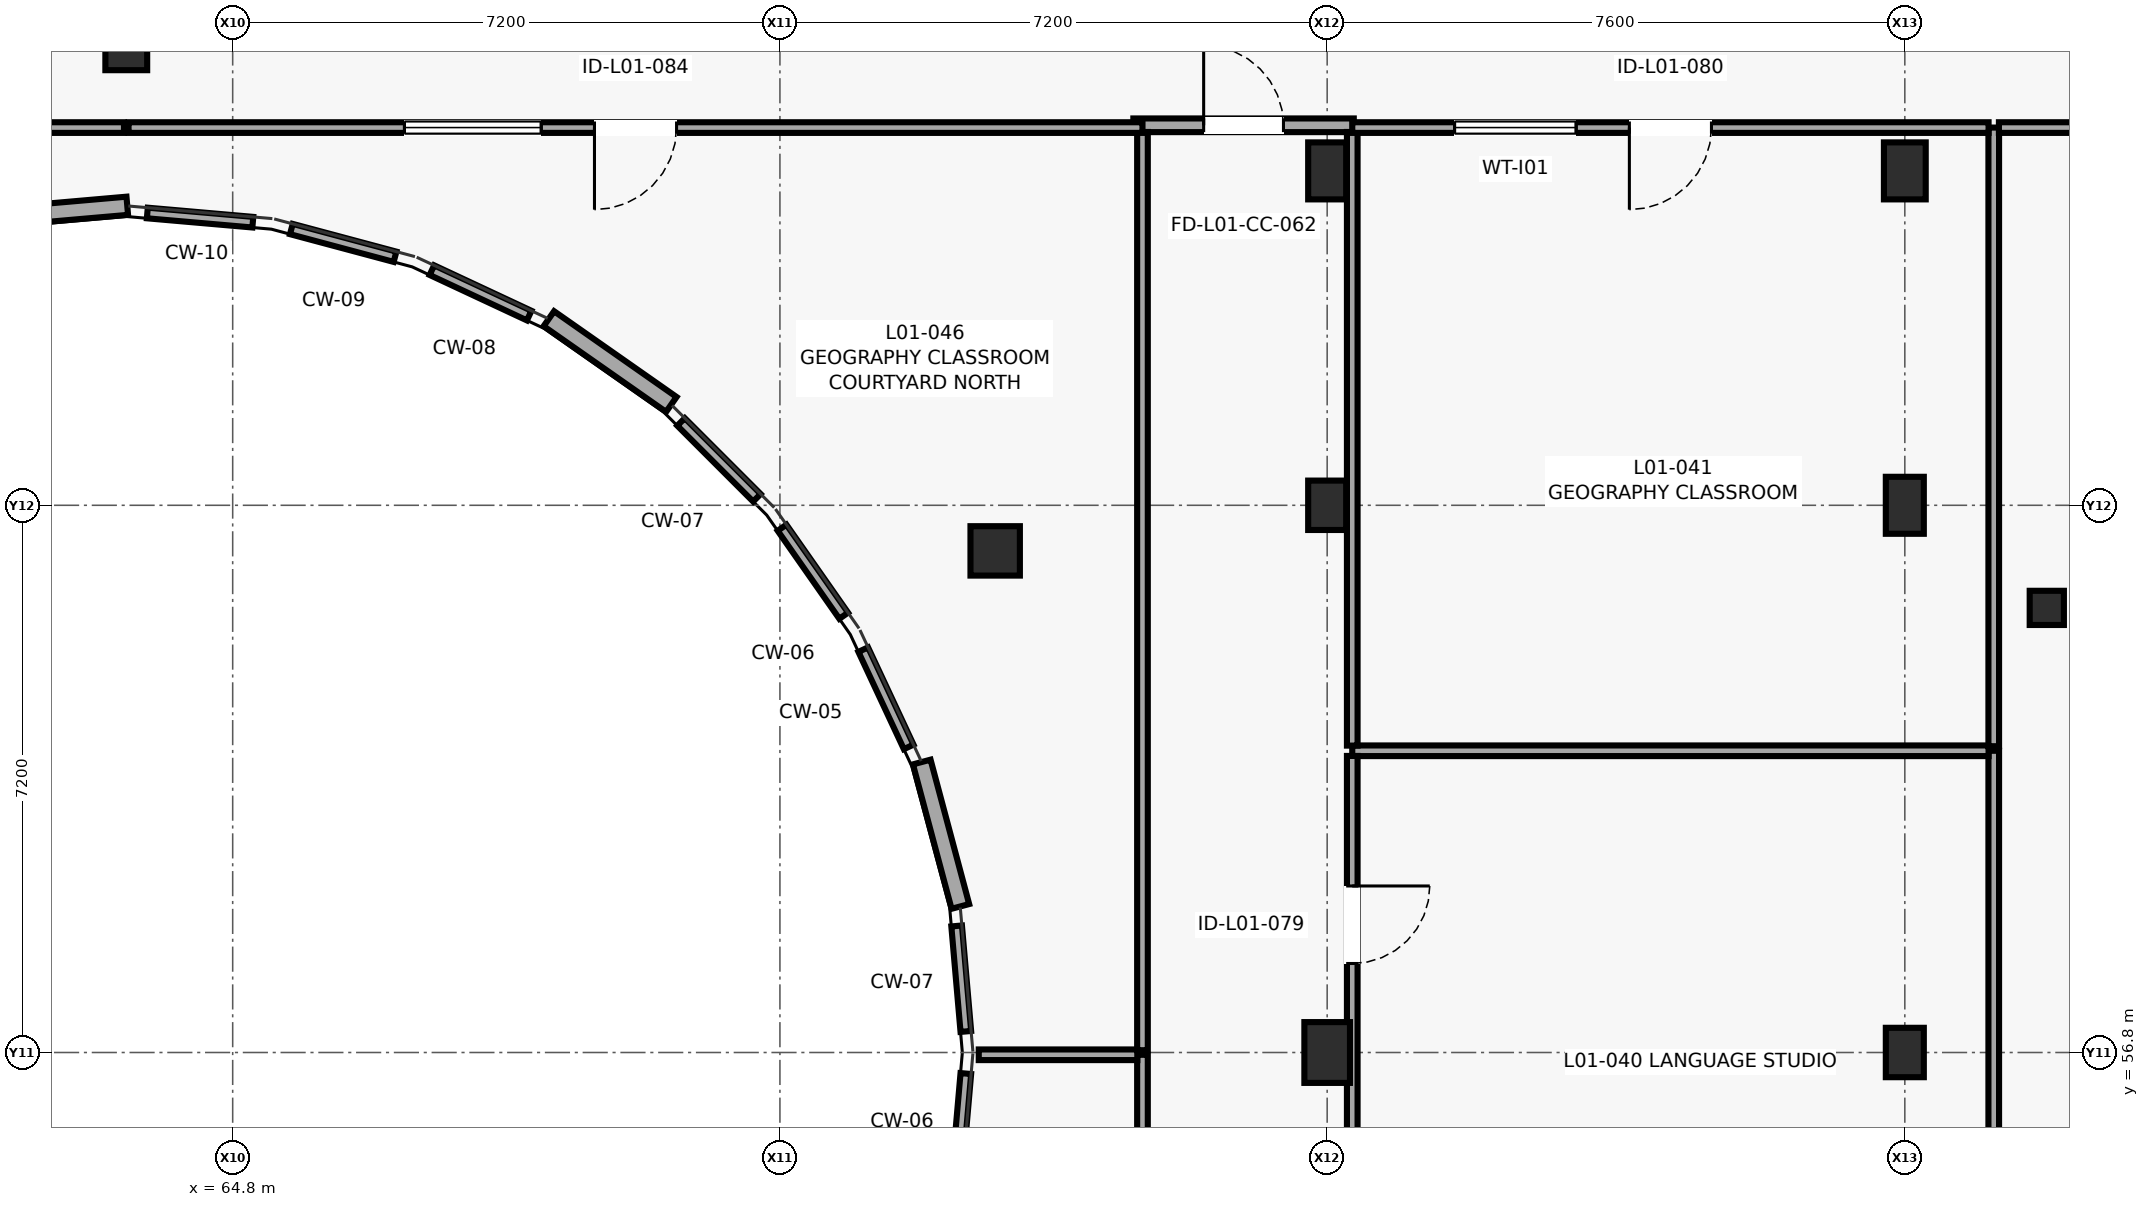
"""IFC4 building model, lengths in metres.
Left out: names, types, materials, properties, quantities, classifications, styles, units other than length and angle.
Written with IfcOpenShell. Run it as: python <this file> out.ifc"""

import sys

from ifc_helpers import new_model, si_unit, direction, frame, frame_2d, origin, origin_2d, place, context, subcontext, project, spatial, rectangle, circle, extrude, element, fill, save


model = new_model("IFC4")
c1 = context("Model", 3, precision=1e-05, world=origin(), true_north=direction((0.0, 1.0)))
c2 = subcontext(c1, "Body", "Model", "MODEL_VIEW")
j1 = project(units=[si_unit("LENGTHUNIT", "METRE"), si_unit("PLANEANGLEUNIT", "RADIAN")], contexts=[c1])
p1 = place(None, origin())
s1 = spatial("IfcSite", under=j1, at=p1, CompositionType="ELEMENT")
p2 = place(p1, origin())
s2 = spatial("IfcBuilding", under=s1, at=p2, CompositionType="ELEMENT")
p3 = place(p2, frame((0.0, 0.0, 4.2)))
s3 = spatial("IfcBuildingStorey", under=s2, at=p3, CompositionType="ELEMENT", Elevation=4.2)
p4 = place(p3, frame((63.4, 70.0, 0.0), z_axis=(0.0, 0.0, 1.0), x_axis=(1.0, 0.0, 0.0)))
e1 = element("IfcColumn", 1, at=p4, inside=s3, PredefinedType="COLUMN", context=c2, shape_type="SweptSolid", body=[
    extrude(circle(Radius=0.275, at=origin_2d()), origin(), (0.0, 0.0, 1.0), 4.0),
])
p5 = place(p3, frame((74.832, 63.4, 0.0), z_axis=(0.0, 0.0, 1.0), x_axis=(1.0, 0.0, 0.0)))
e2 = element("IfcColumn", 2, at=p5, inside=s3, PredefinedType="COLUMN", context=c2, shape_type="SweptSolid", body=[
    extrude(circle(Radius=0.325, at=origin_2d()), origin(), (0.0, 0.0, 1.0), 4.0),
])
p6 = place(p3, frame((79.2, 56.8, 0.0), z_axis=(0.0, 0.0, 1.0), x_axis=(1.0, 0.0, 0.0)))
e3 = element("IfcColumn", 3, at=p6, inside=s3, PredefinedType="COLUMN", context=c2, shape_type="SweptSolid", body=[
    extrude(rectangle(XDim=0.6, YDim=0.8, at=origin_2d()), origin(), (0.0, 0.0, 1.0), 4.0),
])
p7 = place(p3, frame((79.2, 64.0, 0.0), z_axis=(0.0, 0.0, 1.0), x_axis=(1.0, 0.0, 0.0)))
e4 = element("IfcColumn", 4, at=p7, inside=s3, PredefinedType="COLUMN", context=c2, shape_type="SweptSolid", body=[
    extrude(rectangle(XDim=0.5, YDim=0.65, at=origin_2d()), origin(), (0.0, 0.0, 1.0), 4.0),
])
p8 = place(p3, frame((79.2, 68.4, 0.0), z_axis=(0.0, 0.0, 1.0), x_axis=(1.0, 0.0, 0.0)))
e5 = element("IfcColumn", 5, at=p8, inside=s3, PredefinedType="COLUMN", context=c2, shape_type="SweptSolid", body=[
    extrude(rectangle(XDim=0.5, YDim=0.75, at=origin_2d()), origin(), (0.0, 0.0, 1.0), 4.0),
])
p9 = place(p3, frame((86.8, 56.8, 0.0), z_axis=(0.0, 0.0, 1.0), x_axis=(1.0, 0.0, 0.0)))
e6 = element("IfcColumn", 6, at=p9, inside=s3, PredefinedType="COLUMN", context=c2, shape_type="SweptSolid", body=[
    extrude(rectangle(XDim=0.5, YDim=0.65, at=origin_2d()), origin(), (0.0, 0.0, 1.0), 4.0),
])
p10 = place(p3, frame((86.8, 64.0, 0.0), z_axis=(0.0, 0.0, 1.0), x_axis=(1.0, 0.0, 0.0)))
e7 = element("IfcColumn", 7, at=p10, inside=s3, PredefinedType="COLUMN", context=c2, shape_type="SweptSolid", body=[
    extrude(rectangle(XDim=0.5, YDim=0.75, at=origin_2d()), origin(), (0.0, 0.0, 1.0), 4.0),
])
p11 = place(p3, frame((86.8, 68.4, 0.0), z_axis=(0.0, 0.0, 1.0), x_axis=(1.0, 0.0, 0.0)))
e8 = element("IfcColumn", 8, at=p11, inside=s3, PredefinedType="COLUMN", context=c2, shape_type="SweptSolid", body=[
    extrude(rectangle(XDim=0.55, YDim=0.75, at=origin_2d()), origin(), (0.0, 0.0, 1.0), 4.0),
])
p12 = place(p3, frame((88.668, 62.65, 0.0), z_axis=(0.0, 0.0, 1.0), x_axis=(1.0, 0.0, 0.0)))
e9 = element("IfcColumn", 9, at=p12, inside=s3, PredefinedType="COLUMN", context=c2, shape_type="SweptSolid", body=[
    extrude(circle(Radius=0.225, at=origin_2d()), origin(), (0.0, 0.0, 1.0), 4.0),
])
p13 = place(p3, frame((70.571, 65.327, 0.0), z_axis=(0.0, 0.0, 1.0), x_axis=(-0.819132771028, 0.573603960436, 0.0)))
e10 = element("IfcWall", 10, at=p13, inside=s3, PredefinedType="SOLIDWALL", context=c2, shape_type="SweptSolid", body=[
    extrude(rectangle(XDim=1.967, YDim=0.24, at=frame_2d((0.983, 0.0))), origin(), (0.0, 0.0, 1.0), 3.78),
])
p14 = place(p3, frame((63.413, 67.941, 0.0), z_axis=(0.0, 0.0, 1.0), x_axis=(-0.996221008334, -0.0868544907, 0.0)))
e11 = element("IfcWall", 11, at=p14, inside=s3, PredefinedType="SOLIDWALL", context=c2, shape_type="SweptSolid", body=[
    extrude(rectangle(XDim=1.968, YDim=0.24, at=frame_2d((0.984, 0.0))), origin(), (0.0, 0.0, 1.0), 3.78),
])
p15 = place(p3, frame((74.374, 58.722, 0.0), z_axis=(0.0, 0.0, 1.0), x_axis=(-0.258303819724, 0.966063733258, 0.0)))
e12 = element("IfcWall", 12, at=p15, inside=s3, PredefinedType="SOLIDWALL", context=c2, shape_type="SweptSolid", body=[
    extrude(rectangle(XDim=1.967, YDim=0.24, at=frame_2d((0.983, 0.0))), origin(), (0.0, 0.0, 1.0), 3.78),
])
p16 = place(p3, frame((76.65, 69.0, 0.0), z_axis=(0.0, 0.0, 1.0), x_axis=(1.0, 0.0, 0.0)))
e13 = element("IfcWall", 13, at=p16, inside=s3, PredefinedType="PARTITIONING", context=c2, shape_type="SweptSolid", body=[
    extrude(rectangle(XDim=2.9, YDim=0.18, at=frame_2d((1.45, 0.0))), origin(), (0.0, 0.0, 1.0), 3.78),
])
p17 = place(p16, frame((0.925, 0.0, 0.0)))
e14 = element("IfcOpeningElement", 14, at=p17, cuts=e13, PredefinedType="OPENING", context=c2, shape_type="SweptSolid", body=[
    extrude(rectangle(XDim=1.05, YDim=2.15, at=frame_2d((0.525, 1.075))), frame((0.0, 0.1, 0.0), z_axis=(0.0, -1.0, 0.0), x_axis=(1.0, 0.0, 0.0)), (0.0, 0.0, 1.0), 0.2),
])
p18 = place(p3, frame((87.97, 52.83, 0.0), z_axis=(0.0, 0.0, 1.0), x_axis=(0.0, 1.0, 0.0)))
e15 = element("IfcWall", 15, at=p18, inside=s3, PredefinedType="PARTITIONING", context=c2, shape_type="SweptSolid", body=[
    extrude(rectangle(XDim=7.94, YDim=0.14, at=frame_2d((3.97, 0.0))), origin(), (0.0, 0.0, 1.0), 3.775),
])
p19 = place(p3, frame((87.902, 60.77, 0.0), z_axis=(0.0, 0.0, 1.0), x_axis=(-1.0, 0.0, 0.0)))
e16 = element("IfcWall", 16, at=p19, inside=s3, PredefinedType="PARTITIONING", context=c2, shape_type="SweptSolid", body=[
    extrude(rectangle(XDim=8.372, YDim=0.14, at=frame_2d((4.186, 0.0))), origin(), (0.0, 0.0, 1.0), 3.775),
])
p20 = place(p3, frame((79.53, 60.702, 0.0), z_axis=(0.0, 0.0, 1.0), x_axis=(0.0, -1.0, 0.0)))
e17 = element("IfcWall", 17, at=p20, inside=s3, PredefinedType="PARTITIONING", context=c2, shape_type="SweptSolid", body=[
    extrude(rectangle(XDim=7.864, YDim=0.14, at=frame_2d((3.932, 0.0))), origin(), (0.0, 0.0, 1.0), 3.775),
])
p21 = place(p20, frame((1.711, 0.0, 0.0)))
e18 = element("IfcOpeningElement", 18, at=p21, cuts=e17, PredefinedType="OPENING", context=c2, shape_type="SweptSolid", body=[
    extrude(rectangle(XDim=1.02, YDim=2.14, at=frame_2d((0.51, 1.07))), frame((0.0, 0.08, 0.0), z_axis=(0.0, -1.0, 0.0), x_axis=(1.0, 0.0, 0.0)), (0.0, 0.0, 1.0), 0.16),
])
p22 = place(p3, frame((79.53, 68.912, 0.0), z_axis=(0.0, 0.0, 1.0), x_axis=(0.0, -1.0, 0.0)))
e19 = element("IfcWall", 19, at=p22, inside=s3, PredefinedType="PARTITIONING", context=c2, shape_type="SweptSolid", body=[
    extrude(rectangle(XDim=8.074, YDim=0.14, at=frame_2d((4.037, 0.0))), origin(), (0.0, 0.0, 1.0), 3.775),
])
p23 = place(p3, frame((87.97, 60.83, 0.0), z_axis=(0.0, 0.0, 1.0), x_axis=(0.0, 1.0, 0.0)))
e20 = element("IfcWall", 20, at=p23, inside=s3, PredefinedType="PARTITIONING", context=c2, shape_type="SweptSolid", body=[
    extrude(rectangle(XDim=8.14, YDim=0.14, at=frame_2d((4.07, 0.0))), origin(), (0.0, 0.0, 1.0), 3.775),
])
p24 = place(p3, frame((87.902, 68.97, 0.0), z_axis=(0.0, 0.0, 1.0), x_axis=(-1.0, 0.0, 0.0)))
e21 = element("IfcWall", 21, at=p24, inside=s3, PredefinedType="PARTITIONING", context=c2, shape_type="SweptSolid", body=[
    extrude(rectangle(XDim=8.372, YDim=0.14, at=frame_2d((4.186, 0.0))), origin(), (0.0, 0.0, 1.0), 3.775),
])
p25 = place(p24, frame((3.646, 0.0, 0.0)))
e22 = element("IfcOpeningElement", 22, at=p25, cuts=e21, PredefinedType="OPENING", context=c2, shape_type="SweptSolid", body=[
    extrude(rectangle(XDim=1.08, YDim=2.16, at=frame_2d((0.54, 1.08))), frame((0.0, 0.08, 0.0), z_axis=(0.0, -1.0, 0.0), x_axis=(1.0, 0.0, 0.0)), (0.0, 0.0, 1.0), 0.16),
])
p26 = place(p24, frame((5.426, 0.0, 1.05)))
e23 = element("IfcOpeningElement", 23, at=p26, cuts=e21, PredefinedType="OPENING", context=c2, shape_type="SweptSolid", body=[
    extrude(rectangle(XDim=1.6, YDim=1.1, at=frame_2d((0.8, 0.55))), frame((0.0, 0.08, 0.0), z_axis=(0.0, -1.0, 0.0), x_axis=(1.0, 0.0, 0.0)), (0.0, 0.0, 1.0), 0.16),
])
p27 = place(p3, frame((63.37, 68.97, 0.0), z_axis=(0.0, 0.0, 1.0), x_axis=(-1.0, 0.0, 0.0)))
e24 = element("IfcWall", 24, at=p27, inside=s3, PredefinedType="PARTITIONING", context=c2, shape_type="SweptSolid", body=[
    extrude(rectangle(XDim=17.54, YDim=0.14, at=frame_2d((8.77, 0.0))), origin(), (0.0, 0.0, 1.0), 3.775),
])
p28 = place(p27, frame((8.26, 0.0, 0.0)))
e25 = element("IfcOpeningElement", 25, at=p28, cuts=e24, PredefinedType="OPENING", context=c2, shape_type="SweptSolid", body=[
    extrude(rectangle(XDim=1.02, YDim=2.14, at=frame_2d((0.51, 1.07))), frame((0.0, 0.08, 0.0), z_axis=(0.0, -1.0, 0.0), x_axis=(1.0, 0.0, 0.0)), (0.0, 0.0, 1.0), 0.16),
])
p29 = place(p27, frame((9.98, 0.0, 1.05)))
e26 = element("IfcOpeningElement", 26, at=p29, cuts=e24, PredefinedType="OPENING", context=c2, shape_type="SweptSolid", body=[
    extrude(rectangle(XDim=1.4, YDim=1.05, at=frame_2d((0.7, 0.525))), frame((0.0, 0.08, 0.0), z_axis=(0.0, -1.0, 0.0), x_axis=(1.0, 0.0, 0.0)), (0.0, 0.0, 1.0), 0.16),
])
p30 = place(p3, frame((76.77, 44.698, 0.0), z_axis=(0.0, 0.0, 1.0), x_axis=(0.0, 1.0, 0.0)))
e27 = element("IfcWall", 27, at=p30, inside=s3, PredefinedType="PARTITIONING", context=c2, shape_type="SweptSolid", body=[
    extrude(rectangle(XDim=12.072, YDim=0.14, at=frame_2d((6.036, 0.0))), origin(), (0.0, 0.0, 1.0), 3.775),
])
p31 = place(p3, frame((76.702, 56.77, 0.0), z_axis=(0.0, 0.0, 1.0), x_axis=(-1.0, 0.0, 0.0)))
e28 = element("IfcWall", 28, at=p31, inside=s3, PredefinedType="PARTITIONING", context=c2, shape_type="SweptSolid", body=[
    extrude(rectangle(XDim=2.086, YDim=0.14, at=frame_2d((1.043, 0.0))), origin(), (0.0, 0.0, 1.0), 3.775),
])
p32 = place(p3, frame((74.446, 56.523, 0.0), z_axis=(0.0, 0.0, 1.0), x_axis=(-0.086916960031, -0.996215560037, 0.0)))
e29 = element("IfcWall", 29, at=p32, inside=s3, PredefinedType="PARTITIONING", context=c2, shape_type="SweptSolid", body=[
    extrude(rectangle(XDim=1.393, YDim=0.14, at=frame_2d((0.697, 0.0))), origin(), (0.0, 0.0, 1.0), 3.775),
])
p33 = place(p3, frame((70.699, 65.097, 0.0), z_axis=(0.0, 0.0, 1.0), x_axis=(0.707193272138, -0.707020279655, 0.0)))
e30 = element("IfcWall", 30, at=p33, inside=s3, PredefinedType="PARTITIONING", context=c2, shape_type="SweptSolid", body=[
    extrude(rectangle(XDim=1.411, YDim=0.14, at=frame_2d((0.706, 0.0))), origin(), (0.0, 0.0, 1.0), 3.775),
])
p34 = place(p3, frame((72.028, 63.705, 0.0), z_axis=(0.0, 0.0, 1.0), x_axis=(0.57368253481, -0.819077743108, 0.0)))
e31 = element("IfcWall", 31, at=p34, inside=s3, PredefinedType="PARTITIONING", context=c2, shape_type="SweptSolid", body=[
    extrude(rectangle(XDim=1.414, YDim=0.14, at=frame_2d((0.707, 0.0))), origin(), (0.0, 0.0, 1.0), 3.775),
])
p35 = place(p3, frame((73.096, 62.101, 0.0), z_axis=(0.0, 0.0, 1.0), x_axis=(0.423348930736, -0.905966711775, 0.0)))
e32 = element("IfcWall", 32, at=p35, inside=s3, PredefinedType="PARTITIONING", context=c2, shape_type="SweptSolid", body=[
    extrude(rectangle(XDim=1.413, YDim=0.14, at=frame_2d((0.707, 0.0))), origin(), (0.0, 0.0, 1.0), 3.775),
])
p36 = place(p3, frame((74.325, 58.465, 0.0), z_axis=(0.0, 0.0, 1.0), x_axis=(0.086901789347, -0.996216883519, 0.0)))
e33 = element("IfcWall", 33, at=p36, inside=s3, PredefinedType="PARTITIONING", context=c2, shape_type="SweptSolid", body=[
    extrude(rectangle(XDim=1.394, YDim=0.14, at=frame_2d((0.697, 0.0))), origin(), (0.0, 0.0, 1.0), 3.775),
])
p37 = place(p3, frame((76.77, 56.83, 0.0), z_axis=(0.0, 0.0, 1.0), x_axis=(0.0, 1.0, 0.0)))
e34 = element("IfcWall", 34, at=p37, inside=s3, PredefinedType="PARTITIONING", context=c2, shape_type="SweptSolid", body=[
    extrude(rectangle(XDim=12.082, YDim=0.14, at=frame_2d((6.041, 0.0))), origin(), (0.0, 0.0, 1.0), 3.775),
])
p38 = place(p3, frame((76.77, 68.97, 0.0), z_axis=(0.0, 0.0, 1.0), x_axis=(-1.0, 0.0, 0.0)))
e35 = element("IfcWall", 35, at=p38, inside=s3, PredefinedType="PARTITIONING", context=c2, shape_type="SweptSolid", body=[
    extrude(rectangle(XDim=13.34, YDim=0.14, at=frame_2d((6.67, 0.0))), origin(), (0.0, 0.0, 1.0), 3.775),
])
p39 = place(p38, frame((6.13, 0.0, 0.0)))
e36 = element("IfcOpeningElement", 36, at=p39, cuts=e35, PredefinedType="OPENING", context=c2, shape_type="SweptSolid", body=[
    extrude(rectangle(XDim=1.08, YDim=2.16, at=frame_2d((0.54, 1.08))), frame((0.0, 0.08, 0.0), z_axis=(0.0, -1.0, 0.0), x_axis=(1.0, 0.0, 0.0)), (0.0, 0.0, 1.0), 0.16),
])
p40 = place(p38, frame((7.91, 0.0, 1.05)))
e37 = element("IfcOpeningElement", 37, at=p40, cuts=e35, PredefinedType="OPENING", context=c2, shape_type="SweptSolid", body=[
    extrude(rectangle(XDim=1.8, YDim=1.2, at=frame_2d((0.9, 0.6))), frame((0.0, 0.08, 0.0), z_axis=(0.0, -1.0, 0.0), x_axis=(1.0, 0.0, 0.0)), (0.0, 0.0, 1.0), 0.16),
])
p41 = place(p3, frame((63.677, 67.846, 0.0), z_axis=(0.0, 0.0, 1.0), x_axis=(0.99623071841, -0.086743044083, 0.0)))
e38 = element("IfcWall", 38, at=p41, inside=s3, PredefinedType="PARTITIONING", context=c2, shape_type="SweptSolid", body=[
    extrude(rectangle(XDim=1.393, YDim=0.14, at=frame_2d((0.697, 0.0))), origin(), (0.0, 0.0, 1.0), 3.775),
])
p42 = place(p3, frame((65.572, 67.635, 0.0), z_axis=(0.0, 0.0, 1.0), x_axis=(0.966013611766, -0.258491202719, 0.0)))
e39 = element("IfcWall", 39, at=p42, inside=s3, PredefinedType="PARTITIONING", context=c2, shape_type="SweptSolid", body=[
    extrude(rectangle(XDim=1.412, YDim=0.14, at=frame_2d((0.706, 0.0))), origin(), (0.0, 0.0, 1.0), 3.775),
])
p43 = place(p3, frame((67.421, 67.094, 0.0), z_axis=(0.0, 0.0, 1.0), x_axis=(0.906032979506, -0.423207088844, 0.0)))
e40 = element("IfcWall", 40, at=p43, inside=s3, PredefinedType="PARTITIONING", context=c2, shape_type="SweptSolid", body=[
    extrude(rectangle(XDim=1.413, YDim=0.14, at=frame_2d((0.707, 0.0))), origin(), (0.0, 0.0, 1.0), 3.775),
])
p44 = place(p3, frame((98.77, 68.97, 0.0), z_axis=(0.0, 0.0, 1.0), x_axis=(-1.0, 0.0, 0.0)))
e41 = element("IfcWall", 41, at=p44, inside=s3, PredefinedType="PARTITIONING", context=c2, shape_type="SweptSolid", body=[
    extrude(rectangle(XDim=10.732, YDim=0.14, at=frame_2d((5.366, 0.0))), origin(), (0.0, 0.0, 1.0), 3.775),
])
p45 = place(p44, frame((4.826, 0.0, 0.0)))
e42 = element("IfcOpeningElement", 42, at=p45, cuts=e41, PredefinedType="OPENING", context=c2, shape_type="SweptSolid", body=[
    extrude(rectangle(XDim=1.08, YDim=2.16, at=frame_2d((0.54, 1.08))), frame((0.0, 0.08, 0.0), z_axis=(0.0, -1.0, 0.0), x_axis=(1.0, 0.0, 0.0)), (0.0, 0.0, 1.0), 0.16),
])
p46 = place(p44, frame((6.606, 0.0, 1.05)))
e43 = element("IfcOpeningElement", 43, at=p46, cuts=e41, PredefinedType="OPENING", context=c2, shape_type="SweptSolid", body=[
    extrude(rectangle(XDim=1.4, YDim=1.05, at=frame_2d((0.7, 0.525))), frame((0.0, 0.08, 0.0), z_axis=(0.0, -1.0, 0.0), x_axis=(1.0, 0.0, 0.0)), (0.0, 0.0, 1.0), 0.16),
])
p47 = place(p17, origin())
e44 = element("IfcDoor", 44, at=p47, inside=s3, OperationType="SINGLE_SWING_LEFT", PredefinedType="DOOR", context=c2, shape_type="SweptSolid", body=[
    extrude(rectangle(XDim=1.05, YDim=2.15, at=frame_2d((0.525, 1.075))), frame((0.0, 0.025, 0.0), z_axis=(0.0, -1.0, 0.0), x_axis=(1.0, 0.0, 0.0)), (0.0, 0.0, 1.0), 0.05),
])
fill(e14, e44)
p48 = place(p21, origin())
e45 = element("IfcDoor", 45, at=p48, inside=s3, OperationType="SINGLE_SWING_LEFT", PredefinedType="DOOR", context=c2, shape_type="SweptSolid", body=[
    extrude(rectangle(XDim=1.02, YDim=2.14, at=frame_2d((0.51, 1.07))), frame((0.0, 0.025, 0.0), z_axis=(0.0, -1.0, 0.0), x_axis=(1.0, 0.0, 0.0)), (0.0, 0.0, 1.0), 0.05),
])
fill(e18, e45)
p49 = place(p25, origin())
e46 = element("IfcDoor", 46, at=p49, inside=s3, OperationType="SINGLE_SWING_RIGHT", PredefinedType="DOOR", context=c2, shape_type="SweptSolid", body=[
    extrude(rectangle(XDim=1.08, YDim=2.16, at=frame_2d((0.54, 1.08))), frame((0.0, 0.025, 0.0), z_axis=(0.0, -1.0, 0.0), x_axis=(1.0, 0.0, 0.0)), (0.0, 0.0, 1.0), 0.05),
])
fill(e22, e46)
p50 = place(p26, origin())
e47 = element("IfcWindow", 47, at=p50, inside=s3, PartitioningType="SINGLE_PANEL", PredefinedType="WINDOW", context=c2, shape_type="SweptSolid", body=[
    extrude(rectangle(XDim=1.6, YDim=1.1, at=frame_2d((0.8, 0.55))), frame((0.0, 0.03, 0.0), z_axis=(0.0, -1.0, 0.0), x_axis=(1.0, 0.0, 0.0)), (0.0, 0.0, 1.0), 0.06),
])
fill(e23, e47)
p51 = place(p39, origin())
e48 = element("IfcDoor", 48, at=p51, inside=s3, OperationType="SINGLE_SWING_RIGHT", PredefinedType="DOOR", context=c2, shape_type="SweptSolid", body=[
    extrude(rectangle(XDim=1.08, YDim=2.16, at=frame_2d((0.54, 1.08))), frame((0.0, 0.025, 0.0), z_axis=(0.0, -1.0, 0.0), x_axis=(1.0, 0.0, 0.0)), (0.0, 0.0, 1.0), 0.05),
])
fill(e36, e48)
p52 = place(p40, origin())
e49 = element("IfcWindow", 49, at=p52, inside=s3, PartitioningType="SINGLE_PANEL", PredefinedType="WINDOW", context=c2, shape_type="SweptSolid", body=[
    extrude(rectangle(XDim=1.8, YDim=1.2, at=frame_2d((0.9, 0.6))), frame((0.0, 0.03, 0.0), z_axis=(0.0, -1.0, 0.0), x_axis=(1.0, 0.0, 0.0)), (0.0, 0.0, 1.0), 0.06),
])
fill(e37, e49)
save(model, sys.argv[1])
